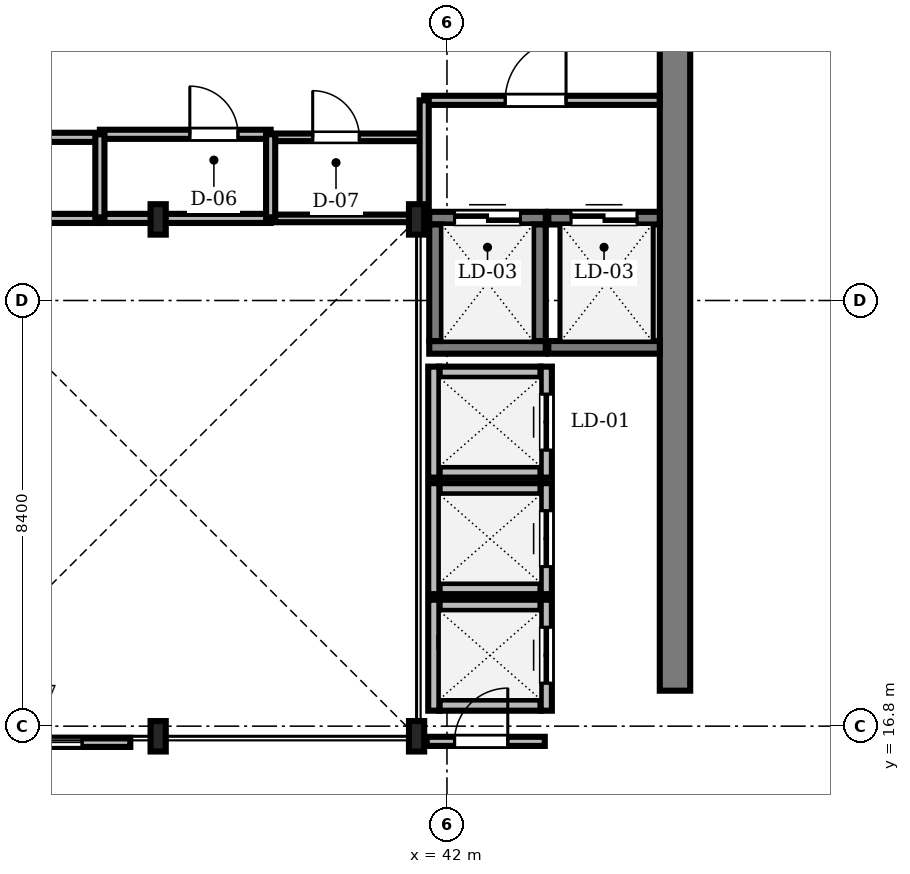
"""IFC4 building model, lengths in metres.
Left out: names, types, materials, properties, quantities, classifications, styles, units other than length and angle.
Written with IfcOpenShell. Run it as: python <this file> out.ifc"""

import sys

from ifc_helpers import new_model, si_unit, direction, frame, frame_2d, origin, origin_2d, place, context, subcontext, project, spatial, rectangle, i_section, extrude, source, transform, mapped, element, fill, save


model = new_model("IFC4")
c1 = context("Model", 3, precision=1e-05, world=origin(), true_north=direction((0.0, 1.0)))
c2 = subcontext(c1, "Body", "Model", "MODEL_VIEW")
j1 = project(units=[si_unit("LENGTHUNIT", "METRE"), si_unit("PLANEANGLEUNIT", "RADIAN")], contexts=[c1])
p1 = place(None, origin())
s1 = spatial("IfcSite", under=j1, at=p1, CompositionType="ELEMENT")
p2 = place(p1, origin())
s2 = spatial("IfcBuilding", under=s1, at=p2, CompositionType="ELEMENT")
p3 = place(p2, frame((0.0, 0.0, 254.55)))
s3 = spatial("IfcBuildingStorey", under=s2, at=p3, CompositionType="ELEMENT", Elevation=254.55)
m1 = source(origin(), c2, "Body", "SweptSolid", [
    extrude(rectangle(XDim=13.15, YDim=0.6, at=frame_2d((6.575, 0.0))), origin(), (0.0, 0.0, 1.0), 3.65),
])
p4 = place(p3, frame((46.5, 17.5, 0.0), z_axis=(0.0, 0.0, 1.0), x_axis=(0.0, 1.0, 0.0)))
e1 = element("IfcWall", 1, at=p4, inside=s3, PredefinedType="SHEAR", context=c2, shape_type="MappedRepresentation", body=[
    mapped(m1, transform((0.0, 0.0, 0.0), scale=1.0)),
])
m2 = source(origin(), c2, "Body", "SweptSolid", [
    extrude(i_section(OverallWidth=0.3, OverallDepth=0.6, WebThickness=0.015, FlangeThickness=0.03, FilletRadius=0.027, at=origin_2d()), origin(), (0.0, 0.0, 1.0), 3.65),
])
for number, where, z_axis, x_axis in (
    (2, (36.3, 16.6, 0.0), (0.0, 0.0, 1.0), (1.0, 0.0, 0.0)),
    (3, (41.4, 16.6, 0.0), (0.0, 0.0, 1.0), (1.0, 0.0, 0.0)),
    (4, (41.4, 26.8, 0.0), (0.0, 0.0, 1.0), (1.0, 0.0, 0.0)),
    (5, (36.3, 26.8, 0.0), (0.0, 0.0, 1.0), (1.0, 0.0, 0.0)),
):
    element("IfcColumn", number, at=place(p3, frame(where, z_axis=z_axis, x_axis=x_axis)), inside=s3, PredefinedType="COLUMN", context=c2, shape_type="MappedRepresentation", body=[
        mapped(m2, transform((0.0, 0.0, 0.0), scale=1.0)),
    ])
m3 = source(origin(), c2, "Body", "SweptSolid", [
    extrude(rectangle(XDim=2.0, YDim=0.22, at=frame_2d((1.0, 0.0))), origin(), (0.0, 0.0, 1.0), 3.65),
])
for number, where, z_axis, x_axis in (
    (6, (41.85, 21.815, 0.0), (0.0, 0.0, 1.0), (1.0, 0.0, 0.0)),
    (7, (41.85, 23.785, 0.0), (0.0, 0.0, 1.0), (1.0, 0.0, 0.0)),
):
    element("IfcWall", number, at=place(p3, frame(where, z_axis=z_axis, x_axis=x_axis)), inside=s3, PredefinedType="SOLIDWALL", context=c2, shape_type="MappedRepresentation", body=[
        mapped(m3, transform((0.0, 0.0, 0.0), scale=1.0)),
    ])
m4 = source(origin(), c2, "Body", "SweptSolid", [
    extrude(rectangle(XDim=2.19, YDim=0.22, at=frame_2d((1.095, 0.0))), origin(), (0.0, 0.0, 1.0), 3.65),
])
p5 = place(p3, frame((41.74, 21.705, 0.0), z_axis=(0.0, 0.0, 1.0), x_axis=(0.0, 1.0, 0.0)))
e8 = element("IfcWall", 8, at=p5, inside=s3, PredefinedType="SOLIDWALL", context=c2, shape_type="MappedRepresentation", body=[
    mapped(m4, transform((0.0, 0.0, 0.0), scale=1.0)),
])
p6 = place(p3, frame((43.96, 21.705, 0.0), z_axis=(0.0, 0.0, 1.0), x_axis=(0.0, 1.0, 0.0)))
e9 = element("IfcWall", 9, at=p6, inside=s3, PredefinedType="SOLIDWALL", context=c2, shape_type="MappedRepresentation", body=[
    mapped(m4, transform((0.0, 0.0, 0.0), scale=1.0)),
])
m5 = source(origin(), c2, "Body", "SweptSolid", [
    extrude(rectangle(XDim=1.1, YDim=2.2, at=frame_2d((0.55, 1.1))), frame((0.0, 0.12, 0.0), z_axis=(0.0, -1.0, 0.0), x_axis=(1.0, 0.0, 0.0)), (0.0, 0.0, 1.0), 0.24),
])
p7 = place(p6, frame((0.545, 0.0, 0.0)))
e10 = element("IfcOpeningElement", 10, at=p7, cuts=e9, PredefinedType="OPENING", context=c2, shape_type="MappedRepresentation", body=[
    mapped(m5, transform((0.0, 0.0, 0.0), scale=1.0)),
])
for number, where, z_axis, x_axis in (
    (11, (41.85, 19.515, 0.0), (0.0, 0.0, 1.0), (1.0, 0.0, 0.0)),
    (12, (41.85, 21.485, 0.0), (0.0, 0.0, 1.0), (1.0, 0.0, 0.0)),
):
    element("IfcWall", number, at=place(p3, frame(where, z_axis=z_axis, x_axis=x_axis)), inside=s3, PredefinedType="SOLIDWALL", context=c2, shape_type="MappedRepresentation", body=[
        mapped(m3, transform((0.0, 0.0, 0.0), scale=1.0)),
    ])
p8 = place(p3, frame((41.74, 19.405, 0.0), z_axis=(0.0, 0.0, 1.0), x_axis=(0.0, 1.0, 0.0)))
e13 = element("IfcWall", 13, at=p8, inside=s3, PredefinedType="SOLIDWALL", context=c2, shape_type="MappedRepresentation", body=[
    mapped(m4, transform((0.0, 0.0, 0.0), scale=1.0)),
])
p9 = place(p3, frame((43.96, 19.405, 0.0), z_axis=(0.0, 0.0, 1.0), x_axis=(0.0, 1.0, 0.0)))
e14 = element("IfcWall", 14, at=p9, inside=s3, PredefinedType="SOLIDWALL", context=c2, shape_type="MappedRepresentation", body=[
    mapped(m4, transform((0.0, 0.0, 0.0), scale=1.0)),
])
p10 = place(p9, frame((0.545, 0.0, 0.0)))
e15 = element("IfcOpeningElement", 15, at=p10, cuts=e14, PredefinedType="OPENING", context=c2, shape_type="MappedRepresentation", body=[
    mapped(m5, transform((0.0, 0.0, 0.0), scale=1.0)),
])
for number, where, z_axis, x_axis in (
    (16, (41.85, 17.215, 0.0), (0.0, 0.0, 1.0), (1.0, 0.0, 0.0)),
    (17, (41.85, 19.185, 0.0), (0.0, 0.0, 1.0), (1.0, 0.0, 0.0)),
):
    element("IfcWall", number, at=place(p3, frame(where, z_axis=z_axis, x_axis=x_axis)), inside=s3, PredefinedType="SOLIDWALL", context=c2, shape_type="MappedRepresentation", body=[
        mapped(m3, transform((0.0, 0.0, 0.0), scale=1.0)),
    ])
p11 = place(p3, frame((41.74, 17.105, 0.0), z_axis=(0.0, 0.0, 1.0), x_axis=(0.0, 1.0, 0.0)))
e18 = element("IfcWall", 18, at=p11, inside=s3, PredefinedType="SOLIDWALL", context=c2, shape_type="MappedRepresentation", body=[
    mapped(m4, transform((0.0, 0.0, 0.0), scale=1.0)),
])
p12 = place(p3, frame((43.96, 17.105, 0.0), z_axis=(0.0, 0.0, 1.0), x_axis=(0.0, 1.0, 0.0)))
e19 = element("IfcWall", 19, at=p12, inside=s3, PredefinedType="SOLIDWALL", context=c2, shape_type="MappedRepresentation", body=[
    mapped(m4, transform((0.0, 0.0, 0.0), scale=1.0)),
])
p13 = place(p12, frame((0.545, 0.0, 0.0)))
e20 = element("IfcOpeningElement", 20, at=p13, cuts=e19, PredefinedType="OPENING", context=c2, shape_type="MappedRepresentation", body=[
    mapped(m5, transform((0.0, 0.0, 0.0), scale=1.0)),
])
m6 = source(origin(), c2, "Body", "SweptSolid", [
    extrude(rectangle(XDim=2.3, YDim=0.25, at=frame_2d((1.15, 0.0))), origin(), (0.0, 0.0, 1.0), 3.65),
])
p14 = place(p3, frame((41.65, 24.275, 0.0), z_axis=(0.0, 0.0, 1.0), x_axis=(1.0, 0.0, 0.0)))
e21 = element("IfcWall", 21, at=p14, inside=s3, PredefinedType="SOLIDWALL", context=c2, shape_type="MappedRepresentation", body=[
    mapped(m6, transform((0.0, 0.0, 0.0), scale=1.0)),
])
p15 = place(p3, frame((41.65, 26.825, 0.0), z_axis=(0.0, 0.0, 1.0), x_axis=(1.0, 0.0, 0.0)))
e22 = element("IfcWall", 22, at=p15, inside=s3, PredefinedType="SOLIDWALL", context=c2, shape_type="MappedRepresentation", body=[
    mapped(m6, transform((0.0, 0.0, 0.0), scale=1.0)),
])
m7 = source(origin(), c2, "Body", "SweptSolid", [
    extrude(rectangle(XDim=1.3, YDim=2.3, at=frame_2d((0.65, 1.15))), frame((0.0, 0.135, 0.0), z_axis=(0.0, -1.0, 0.0), x_axis=(1.0, 0.0, 0.0)), (0.0, 0.0, 1.0), 0.27),
])
p16 = place(p15, frame((0.5, 0.0, 0.0)))
e23 = element("IfcOpeningElement", 23, at=p16, cuts=e22, PredefinedType="OPENING", context=c2, shape_type="MappedRepresentation", body=[
    mapped(m7, transform((0.0, 0.0, 0.0), scale=1.0)),
])
for number, where, z_axis, x_axis in (
    (24, (41.775, 24.4, 0.0), (0.0, 0.0, 1.0), (0.0, 1.0, 0.0)),
    (25, (43.825, 24.4, 0.0), (0.0, 0.0, 1.0), (0.0, 1.0, 0.0)),
):
    element("IfcWall", number, at=place(p3, frame(where, z_axis=z_axis, x_axis=x_axis)), inside=s3, PredefinedType="SOLIDWALL", context=c2, shape_type="MappedRepresentation", body=[
        mapped(m6, transform((0.0, 0.0, 0.0), scale=1.0)),
    ])
m8 = source(origin(), c2, "Body", "SweptSolid", [
    extrude(rectangle(XDim=2.2, YDim=0.25, at=frame_2d((1.1, 0.0))), origin(), (0.0, 0.0, 1.0), 3.65),
])
p17 = place(p3, frame((44.0, 24.275, 0.0), z_axis=(0.0, 0.0, 1.0), x_axis=(1.0, 0.0, 0.0)))
e26 = element("IfcWall", 26, at=p17, inside=s3, PredefinedType="SOLIDWALL", context=c2, shape_type="MappedRepresentation", body=[
    mapped(m8, transform((0.0, 0.0, 0.0), scale=1.0)),
])
p18 = place(p3, frame((44.0, 26.825, 0.0), z_axis=(0.0, 0.0, 1.0), x_axis=(1.0, 0.0, 0.0)))
e27 = element("IfcWall", 27, at=p18, inside=s3, PredefinedType="SOLIDWALL", context=c2, shape_type="MappedRepresentation", body=[
    mapped(m8, transform((0.0, 0.0, 0.0), scale=1.0)),
])
p19 = place(p18, frame((0.45, 0.0, 0.0)))
e28 = element("IfcOpeningElement", 28, at=p19, cuts=e27, PredefinedType="OPENING", context=c2, shape_type="MappedRepresentation", body=[
    mapped(m7, transform((0.0, 0.0, 0.0), scale=1.0)),
])
m9 = source(origin(), c2, "Body", "SweptSolid", [
    extrude(rectangle(XDim=4.648, YDim=0.18, at=frame_2d((2.324, 0.0))), origin(), (0.0, 0.0, 1.0), 3.282),
])
p20 = place(p3, frame((41.55, 29.15, 0.0), z_axis=(0.0, 0.0, 1.0), x_axis=(1.0, 0.0, 0.0)))
e29 = element("IfcWall", 29, at=p20, inside=s3, PredefinedType="PARTITIONING", context=c2, shape_type="MappedRepresentation", body=[
    mapped(m9, transform((0.0, 0.0, 0.0), scale=1.0)),
])
m10 = source(origin(), c2, "Body", "SweptSolid", [
    extrude(rectangle(XDim=1.2, YDim=2.2, at=frame_2d((0.6, 1.1))), frame((0.0, 0.1, 0.0), z_axis=(0.0, -1.0, 0.0), x_axis=(1.0, 0.0, 0.0)), (0.0, 0.0, 1.0), 0.2),
])
p21 = place(p20, frame((1.6, 0.0, 0.0)))
e30 = element("IfcOpeningElement", 30, at=p21, cuts=e29, PredefinedType="OPENING", context=c2, shape_type="MappedRepresentation", body=[
    mapped(m10, transform((0.0, 0.0, 0.0), scale=1.0)),
])
m11 = source(origin(), c2, "Body", "SweptSolid", [
    extrude(rectangle(XDim=3.7, YDim=0.18, at=frame_2d((1.85, 0.0))), origin(), (0.0, 0.0, 1.0), 3.282),
])
p22 = place(p3, frame((31.45, 28.42, 0.0), z_axis=(0.0, 0.0, 1.0), x_axis=(1.0, 0.0, 0.0)))
e31 = element("IfcWall", 31, at=p22, inside=s3, PredefinedType="PARTITIONING", context=c2, shape_type="MappedRepresentation", body=[
    mapped(m11, transform((0.0, 0.0, 0.0), scale=1.0)),
])
m12 = source(origin(), c2, "Body", "SweptSolid", [
    extrude(rectangle(XDim=0.92, YDim=2.1, at=frame_2d((0.46, 1.05))), frame((0.0, 0.1, 0.0), z_axis=(0.0, -1.0, 0.0), x_axis=(1.0, 0.0, 0.0)), (0.0, 0.0, 1.0), 0.2),
])
p23 = place(p22, frame((0.9, 0.0, 0.0)))
e32 = element("IfcOpeningElement", 32, at=p23, cuts=e31, PredefinedType="OPENING", context=c2, shape_type="MappedRepresentation", body=[
    mapped(m12, transform((0.0, 0.0, 0.0), scale=1.0)),
])
m13 = source(origin(), c2, "Body", "SweptSolid", [
    extrude(rectangle(XDim=3.37, YDim=0.18, at=frame_2d((1.685, 0.0))), origin(), (0.0, 0.0, 1.0), 3.65),
])
p24 = place(p3, frame((35.15, 28.48, 0.0), z_axis=(0.0, 0.0, 1.0), x_axis=(1.0, 0.0, 0.0)))
e33 = element("IfcWall", 33, at=p24, inside=s3, PredefinedType="PARTITIONING", context=c2, shape_type="MappedRepresentation", body=[
    mapped(m13, transform((0.0, 0.0, 0.0), scale=1.0)),
])
m14 = source(origin(), c2, "Body", "SweptSolid", [
    extrude(rectangle(XDim=0.95, YDim=2.15, at=frame_2d((0.475, 1.075))), frame((0.0, 0.1, 0.0), z_axis=(0.0, -1.0, 0.0), x_axis=(1.0, 0.0, 0.0)), (0.0, 0.0, 1.0), 0.2),
])
p25 = place(p24, frame((1.775, 0.0, 0.0)))
e34 = element("IfcOpeningElement", 34, at=p25, cuts=e33, PredefinedType="OPENING", context=c2, shape_type="MappedRepresentation", body=[
    mapped(m14, transform((0.0, 0.0, 0.0), scale=1.0)),
])
m15 = source(origin(), c2, "Body", "SweptSolid", [
    extrude(rectangle(XDim=3.0, YDim=0.15, at=frame_2d((1.5, 0.0))), origin(), (0.0, 0.0, 1.0), 3.65),
])
p26 = place(p3, frame((38.52, 28.42, 0.0), z_axis=(0.0, 0.0, 1.0), x_axis=(1.0, 0.0, 0.0)))
e35 = element("IfcWall", 35, at=p26, inside=s3, PredefinedType="PARTITIONING", context=c2, shape_type="MappedRepresentation", body=[
    mapped(m15, transform((0.0, 0.0, 0.0), scale=1.0)),
])
m16 = source(origin(), c2, "Body", "SweptSolid", [
    extrude(rectangle(XDim=0.92, YDim=2.1, at=frame_2d((0.46, 1.05))), frame((0.0, 0.085, 0.0), z_axis=(0.0, -1.0, 0.0), x_axis=(1.0, 0.0, 0.0)), (0.0, 0.0, 1.0), 0.17),
])
p27 = place(p26, frame((0.83, 0.0, 0.0)))
e36 = element("IfcOpeningElement", 36, at=p27, cuts=e35, PredefinedType="OPENING", context=c2, shape_type="MappedRepresentation", body=[
    mapped(m16, transform((0.0, 0.0, 0.0), scale=1.0)),
])
m17 = source(origin(), c2, "Body", "SweptSolid", [
    extrude(rectangle(XDim=2.33, YDim=0.18, at=frame_2d((1.165, 0.0))), origin(), (0.0, 0.0, 1.0), 3.092),
])
p28 = place(p3, frame((41.6, 16.5, 0.0), z_axis=(0.0, 0.0, 1.0), x_axis=(1.0, 0.0, 0.0)))
e37 = element("IfcWall", 37, at=p28, inside=s3, PredefinedType="PARTITIONING", context=c2, shape_type="MappedRepresentation", body=[
    mapped(m17, transform((0.0, 0.0, 0.0), scale=1.0)),
])
m18 = source(origin(), c2, "Body", "SweptSolid", [
    extrude(rectangle(XDim=1.05, YDim=2.2, at=frame_2d((0.525, 1.1))), frame((0.0, 0.1, 0.0), z_axis=(0.0, -1.0, 0.0), x_axis=(1.0, 0.0, 0.0)), (0.0, 0.0, 1.0), 0.2),
])
p29 = place(p28, frame((0.55, 0.0, 0.0)))
e38 = element("IfcOpeningElement", 38, at=p29, cuts=e37, PredefinedType="OPENING", context=c2, shape_type="MappedRepresentation", body=[
    mapped(m18, transform((0.0, 0.0, 0.0), scale=1.0)),
])
m19 = source(origin(), c2, "Body", "SweptSolid", [
    extrude(rectangle(XDim=3.7, YDim=0.18, at=frame_2d((1.85, 0.0))), origin(), (0.0, 0.0, 1.0), 3.192),
])
p30 = place(p3, frame((31.45, 26.82, 0.0), z_axis=(0.0, 0.0, 1.0), x_axis=(1.0, 0.0, 0.0)))
e39 = element("IfcWall", 39, at=p30, inside=s3, PredefinedType="PARTITIONING", context=c2, shape_type="MappedRepresentation", body=[
    mapped(m19, transform((0.0, 0.0, 0.0), scale=1.0)),
])
m20 = source(origin(), c2, "Body", "SweptSolid", [
    extrude(rectangle(XDim=3.37, YDim=0.18, at=frame_2d((1.685, 0.0))), origin(), (0.0, 0.0, 1.0), 3.192),
])
p31 = place(p3, frame((35.15, 26.82, 0.0), z_axis=(0.0, 0.0, 1.0), x_axis=(1.0, 0.0, 0.0)))
e40 = element("IfcWall", 40, at=p31, inside=s3, PredefinedType="PARTITIONING", context=c2, shape_type="MappedRepresentation", body=[
    mapped(m20, transform((0.0, 0.0, 0.0), scale=1.0)),
])
m21 = source(origin(), c2, "Body", "SweptSolid", [
    extrude(rectangle(XDim=3.0, YDim=0.15, at=frame_2d((1.5, 0.0))), origin(), (0.0, 0.0, 1.0), 3.192),
])
p32 = place(p3, frame((38.52, 26.82, 0.0), z_axis=(0.0, 0.0, 1.0), x_axis=(1.0, 0.0, 0.0)))
e41 = element("IfcWall", 41, at=p32, inside=s3, PredefinedType="PARTITIONING", context=c2, shape_type="MappedRepresentation", body=[
    mapped(m21, transform((0.0, 0.0, 0.0), scale=1.0)),
])
m22 = source(origin(), c2, "Body", "SweptSolid", [
    extrude(rectangle(XDim=2.35, YDim=0.18, at=frame_2d((1.175, 0.0))), origin(), (0.0, 0.0, 1.0), 3.282),
])
p33 = place(p3, frame((41.55, 26.8, 0.0), z_axis=(0.0, 0.0, 1.0), x_axis=(0.0, 1.0, 0.0)))
e42 = element("IfcWall", 42, at=p33, inside=s3, PredefinedType="PARTITIONING", context=c2, shape_type="MappedRepresentation", body=[
    mapped(m22, transform((0.0, 0.0, 0.0), scale=1.0)),
])
m23 = source(origin(), c2, "Body", "SweptSolid", [
    extrude(rectangle(XDim=1.858, YDim=0.18, at=frame_2d((0.929, 0.0))), origin(), (0.0, 0.0, 1.0), 3.65),
])
p34 = place(p3, frame((41.852, 18.45, 0.0), z_axis=(0.0, 0.0, 1.0), x_axis=(1.0, 0.0, 0.0)))
e43 = element("IfcWall", 43, at=p34, inside=s3, PredefinedType="PARTITIONING", context=c2, shape_type="MappedRepresentation", body=[
    mapped(m23, transform((0.0, 0.0, 0.0), scale=1.0)),
])
m24 = source(origin(), c2, "Body", "SweptSolid", [
    extrude(rectangle(XDim=1.66, YDim=0.18, at=frame_2d((0.83, 0.0))), origin(), (0.0, 0.0, 1.0), 3.192),
])
for number, where, z_axis, x_axis in (
    (44, (35.15, 26.82, 0.0), (0.0, 0.0, 1.0), (0.0, 1.0, 0.0)),
    (45, (38.52, 26.82, 0.0), (0.0, 0.0, 1.0), (0.0, 1.0, 0.0)),
):
    element("IfcWall", number, at=place(p3, frame(where, z_axis=z_axis, x_axis=x_axis)), inside=s3, PredefinedType="PARTITIONING", context=c2, shape_type="MappedRepresentation", body=[
        mapped(m24, transform((0.0, 0.0, 0.0), scale=1.0)),
    ])
m25 = source(origin(), c2, "Body", "SweptSolid", [
    extrude(rectangle(XDim=3.9, YDim=0.18, at=frame_2d((1.95, 0.0))), origin(), (0.0, 0.0, 1.0), 3.192),
])
p35 = place(p3, frame((31.85, 16.48, 0.0), z_axis=(0.0, 0.0, 1.0), x_axis=(1.0, 0.0, 0.0)))
e46 = element("IfcWall", 46, at=p35, inside=s3, PredefinedType="PARTITIONING", context=c2, shape_type="MappedRepresentation", body=[
    mapped(m25, transform((0.0, 0.0, 0.0), scale=1.0)),
])
m26 = source(origin(), c2, "Body", "SweptSolid", [
    extrude(rectangle(XDim=2.0, YDim=1.9, at=frame_2d((1.0, 0.95))), frame((0.0, 0.1, 0.0), z_axis=(0.0, -1.0, 0.0), x_axis=(1.0, 0.0, 0.0)), (0.0, 0.0, 1.0), 0.2),
])
p36 = place(p35, frame((0.95, 0.0, 0.55)))
e47 = element("IfcOpeningElement", 47, at=p36, cuts=e46, PredefinedType="OPENING", context=c2, shape_type="MappedRepresentation", body=[
    mapped(m26, transform((0.0, 0.0, 0.0), scale=1.0)),
])
m27 = source(origin(), c2, "Body", "SweptSolid", [
    extrude(rectangle(XDim=1.1, YDim=2.2, at=frame_2d((0.55, 1.1))), frame((0.0, 0.025, 0.0), z_axis=(0.0, -1.0, 0.0), x_axis=(1.0, 0.0, 0.0)), (0.0, 0.0, 1.0), 0.05),
])
p37 = place(p7, origin())
e48 = element("IfcDoor", 48, at=p37, inside=s3, OperationType="DOUBLE_DOOR_SLIDING", PredefinedType="DOOR", context=c2, shape_type="MappedRepresentation", body=[
    mapped(m27, transform((0.0, 0.0, 0.0), scale=1.0)),
])
fill(e10, e48)
p38 = place(p10, origin())
e49 = element("IfcDoor", 49, at=p38, inside=s3, OperationType="DOUBLE_DOOR_SLIDING", PredefinedType="DOOR", context=c2, shape_type="MappedRepresentation", body=[
    mapped(m27, transform((0.0, 0.0, 0.0), scale=1.0)),
])
fill(e15, e49)
p39 = place(p13, origin())
e50 = element("IfcDoor", 50, at=p39, inside=s3, OperationType="DOUBLE_DOOR_SLIDING", PredefinedType="DOOR", context=c2, shape_type="MappedRepresentation", body=[
    mapped(m27, transform((0.0, 0.0, 0.0), scale=1.0)),
])
fill(e20, e50)
m28 = source(origin(), c2, "Body", "SweptSolid", [
    extrude(rectangle(XDim=1.3, YDim=2.3, at=frame_2d((0.65, 1.15))), frame((0.0, 0.025, 0.0), z_axis=(0.0, -1.0, 0.0), x_axis=(1.0, 0.0, 0.0)), (0.0, 0.0, 1.0), 0.05),
])
p40 = place(p16, origin())
e51 = element("IfcDoor", 51, at=p40, inside=s3, OperationType="DOUBLE_DOOR_SLIDING", PredefinedType="DOOR", context=c2, shape_type="MappedRepresentation", body=[
    mapped(m28, transform((0.0, 0.0, 0.0), scale=1.0)),
])
fill(e23, e51)
p41 = place(p19, origin())
e52 = element("IfcDoor", 52, at=p41, inside=s3, OperationType="DOUBLE_DOOR_SLIDING", PredefinedType="DOOR", context=c2, shape_type="MappedRepresentation", body=[
    mapped(m28, transform((0.0, 0.0, 0.0), scale=1.0)),
])
fill(e28, e52)
m29 = source(origin(), c2, "Body", "SweptSolid", [
    extrude(rectangle(XDim=1.2, YDim=2.2, at=frame_2d((0.6, 1.1))), frame((0.0, 0.025, 0.0), z_axis=(0.0, -1.0, 0.0), x_axis=(1.0, 0.0, 0.0)), (0.0, 0.0, 1.0), 0.05),
])
p42 = place(p21, origin())
e53 = element("IfcDoor", 53, at=p42, inside=s3, OperationType="SINGLE_SWING_RIGHT", PredefinedType="DOOR", context=c2, shape_type="MappedRepresentation", body=[
    mapped(m29, transform((0.0, 0.0, 0.0), scale=1.0)),
])
fill(e30, e53)
m30 = source(origin(), c2, "Body", "SweptSolid", [
    extrude(rectangle(XDim=0.95, YDim=2.15, at=frame_2d((0.475, 1.075))), frame((0.0, 0.025, 0.0), z_axis=(0.0, -1.0, 0.0), x_axis=(1.0, 0.0, 0.0)), (0.0, 0.0, 1.0), 0.05),
])
p43 = place(p25, origin())
e54 = element("IfcDoor", 54, at=p43, inside=s3, OperationType="SINGLE_SWING_LEFT", PredefinedType="DOOR", context=c2, shape_type="MappedRepresentation", body=[
    mapped(m30, transform((0.0, 0.0, 0.0), scale=1.0)),
])
fill(e34, e54)
m31 = source(origin(), c2, "Body", "SweptSolid", [
    extrude(rectangle(XDim=0.92, YDim=2.1, at=frame_2d((0.46, 1.05))), frame((0.0, 0.025, 0.0), z_axis=(0.0, -1.0, 0.0), x_axis=(1.0, 0.0, 0.0)), (0.0, 0.0, 1.0), 0.05),
])
p44 = place(p27, origin())
e55 = element("IfcDoor", 55, at=p44, inside=s3, OperationType="SINGLE_SWING_LEFT", PredefinedType="DOOR", context=c2, shape_type="MappedRepresentation", body=[
    mapped(m31, transform((0.0, 0.0, 0.0), scale=1.0)),
])
fill(e36, e55)
m32 = source(origin(), c2, "Body", "SweptSolid", [
    extrude(rectangle(XDim=1.05, YDim=2.2, at=frame_2d((0.525, 1.1))), frame((0.0, 0.025, 0.0), z_axis=(0.0, -1.0, 0.0), x_axis=(1.0, 0.0, 0.0)), (0.0, 0.0, 1.0), 0.05),
])
p45 = place(p29, origin())
e56 = element("IfcDoor", 56, at=p45, inside=s3, OperationType="SINGLE_SWING_RIGHT", PredefinedType="DOOR", context=c2, shape_type="MappedRepresentation", body=[
    mapped(m32, transform((0.0, 0.0, 0.0), scale=1.0)),
])
fill(e38, e56)
m33 = source(origin(), c2, "Body", "SweptSolid", [
    extrude(rectangle(XDim=2.0, YDim=1.9, at=frame_2d((1.0, 0.95))), frame((0.0, 0.03, 0.0), z_axis=(0.0, -1.0, 0.0), x_axis=(1.0, 0.0, 0.0)), (0.0, 0.0, 1.0), 0.06),
])
p46 = place(p36, origin())
e57 = element("IfcWindow", 57, at=p46, inside=s3, PartitioningType="SINGLE_PANEL", PredefinedType="WINDOW", context=c2, shape_type="MappedRepresentation", body=[
    mapped(m33, transform((0.0, 0.0, 0.0), scale=1.0)),
])
fill(e47, e57)
save(model, sys.argv[1])
